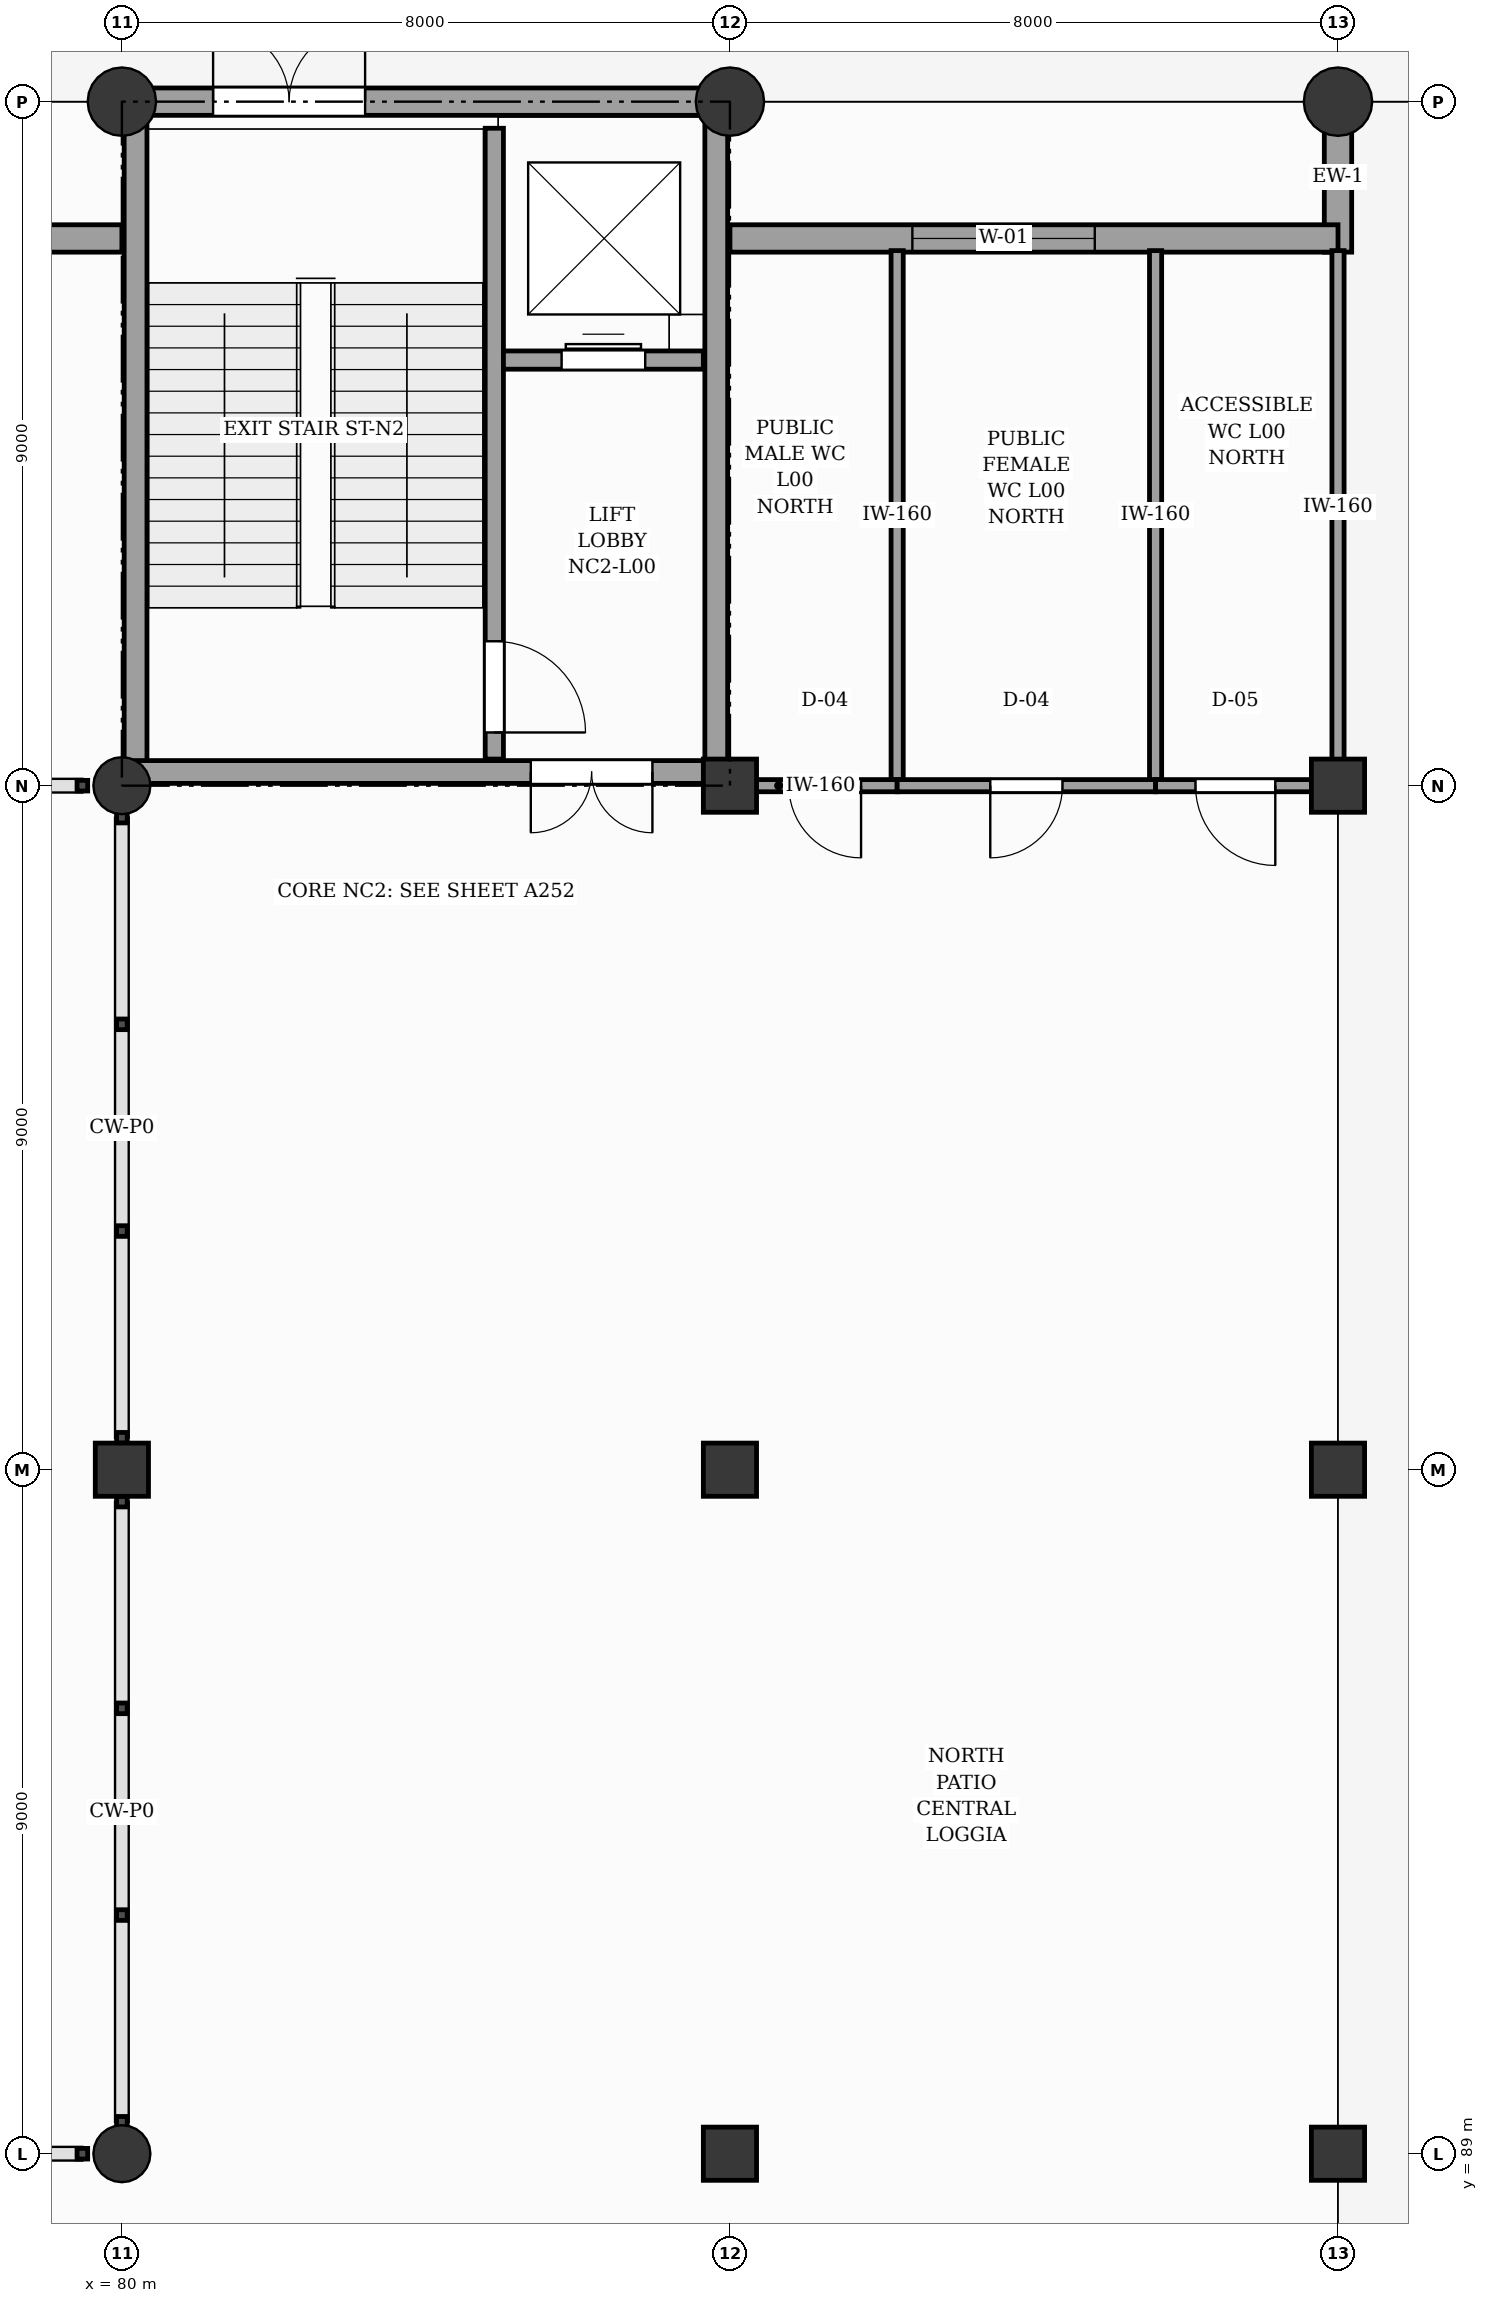
"""IFC4 building model, lengths in metres.
Left out: names, types, materials, properties, quantities, classifications, styles, units other than length and angle.
Written with IfcOpenShell. Run it as: python <this file> out.ifc"""

import sys

from ifc_helpers import new_model, si_unit, direction, frame, frame_2d, origin, origin_2d, place, context, subcontext, project, spatial, rectangle, circle, extrude, element, fill, save


model = new_model("IFC4")
c1 = context("Model", 3, precision=1e-05, world=origin(), true_north=direction((0.0, 1.0)))
c2 = subcontext(c1, "Body", "Model", "MODEL_VIEW")
j1 = project(units=[si_unit("LENGTHUNIT", "METRE"), si_unit("PLANEANGLEUNIT", "RADIAN")], contexts=[c1])
p1 = place(None, origin())
s1 = spatial("IfcSite", under=j1, at=p1, CompositionType="ELEMENT")
p2 = place(p1, origin())
s2 = spatial("IfcBuilding", under=s1, at=p2, CompositionType="ELEMENT")
p3 = place(p2, origin())
s3 = spatial("IfcBuildingStorey", under=s2, at=p3, CompositionType="ELEMENT", Elevation=0.0)
p4 = place(p3, frame((80.0, 89.0, -0.3), z_axis=(0.0, 0.0, 1.0), x_axis=(1.0, 0.0, 0.0)))
e1 = element("IfcColumn", 1, at=p4, inside=s3, PredefinedType="PILASTER", context=c2, shape_type="SweptSolid", body=[
    extrude(circle(Radius=0.375, at=origin_2d()), origin(), (0.0, 0.0, 1.0), 5.1),
])
p5 = place(p3, frame((80.0, 98.0, -0.3), z_axis=(0.0, 0.0, 1.0), x_axis=(1.0, 0.0, 0.0)))
e2 = element("IfcColumn", 2, at=p5, inside=s3, PredefinedType="COLUMN", context=c2, shape_type="SweptSolid", body=[
    extrude(rectangle(XDim=0.7, YDim=0.7, at=origin_2d()), origin(), (0.0, 0.0, 1.0), 5.1),
])
p6 = place(p3, frame((80.0, 107.0, -0.3), z_axis=(0.0, 0.0, 1.0), x_axis=(1.0, 0.0, 0.0)))
e3 = element("IfcColumn", 3, at=p6, inside=s3, PredefinedType="PILASTER", context=c2, shape_type="SweptSolid", body=[
    extrude(circle(Radius=0.375, at=origin_2d()), origin(), (0.0, 0.0, 1.0), 5.1),
])
p7 = place(p3, frame((80.0, 116.0, -0.3), z_axis=(0.0, 0.0, 1.0), x_axis=(1.0, 0.0, 0.0)))
e4 = element("IfcColumn", 4, at=p7, inside=s3, PredefinedType="PILASTER", context=c2, shape_type="SweptSolid", body=[
    extrude(circle(Radius=0.45, at=origin_2d()), origin(), (0.0, 0.0, 1.0), 5.1),
])
for number, where, z_axis, x_axis in (
    (5, (88.0, 89.0, -0.3), (0.0, 0.0, 1.0), (1.0, 0.0, 0.0)),
    (6, (88.0, 98.0, -0.3), (0.0, 0.0, 1.0), (1.0, 0.0, 0.0)),
    (7, (88.0, 107.0, -0.3), (0.0, 0.0, 1.0), (1.0, 0.0, 0.0)),
):
    element("IfcColumn", number, at=place(p3, frame(where, z_axis=z_axis, x_axis=x_axis)), inside=s3, PredefinedType="COLUMN", context=c2, shape_type="SweptSolid", body=[
        extrude(rectangle(XDim=0.7, YDim=0.7, at=origin_2d()), origin(), (0.0, 0.0, 1.0), 5.1),
    ])
p8 = place(p3, frame((88.0, 116.0, -0.3), z_axis=(0.0, 0.0, 1.0), x_axis=(1.0, 0.0, 0.0)))
e8 = element("IfcColumn", 8, at=p8, inside=s3, PredefinedType="PILASTER", context=c2, shape_type="SweptSolid", body=[
    extrude(circle(Radius=0.45, at=origin_2d()), origin(), (0.0, 0.0, 1.0), 5.1),
])
for number, where, z_axis, x_axis in (
    (9, (96.0, 89.0, -0.3), (0.0, 0.0, 1.0), (1.0, 0.0, 0.0)),
    (10, (96.0, 98.0, -0.3), (0.0, 0.0, 1.0), (1.0, 0.0, 0.0)),
    (11, (96.0, 107.0, -0.3), (0.0, 0.0, 1.0), (1.0, 0.0, 0.0)),
):
    element("IfcColumn", number, at=place(p3, frame(where, z_axis=z_axis, x_axis=x_axis)), inside=s3, PredefinedType="COLUMN", context=c2, shape_type="SweptSolid", body=[
        extrude(rectangle(XDim=0.7, YDim=0.7, at=origin_2d()), origin(), (0.0, 0.0, 1.0), 5.1),
    ])
p9 = place(p3, frame((96.0, 116.0, -0.3), z_axis=(0.0, 0.0, 1.0), x_axis=(1.0, 0.0, 0.0)))
e12 = element("IfcColumn", 12, at=p9, inside=s3, PredefinedType="PILASTER", context=c2, shape_type="SweptSolid", body=[
    extrude(circle(Radius=0.45, at=origin_2d()), origin(), (0.0, 0.0, 1.0), 5.1),
])
p10 = place(p3, frame((72.0, 114.2, 0.0), z_axis=(0.0, 0.0, 1.0), x_axis=(1.0, 0.0, 0.0)))
e13 = element("IfcWall", 13, at=p10, inside=s3, PredefinedType="SOLIDWALL", context=c2, shape_type="SweptSolid", body=[
    extrude(rectangle(XDim=8.0, YDim=0.36, at=frame_2d((4.0, 0.0))), origin(), (0.0, 0.0, 1.0), 3.84),
])
p11 = place(p10, frame((2.4, 0.0, 0.9)))
e14 = element("IfcOpeningElement", 14, at=p11, cuts=e13, PredefinedType="OPENING", context=c2, shape_type="SweptSolid", body=[
    extrude(rectangle(XDim=2.4, YDim=2.6, at=frame_2d((1.2, 1.3))), frame((0.0, 0.19, 0.0), z_axis=(0.0, -1.0, 0.0), x_axis=(1.0, 0.0, 0.0)), (0.0, 0.0, 1.0), 0.38),
])
p12 = place(p3, frame((80.4, 116.0, 0.0), z_axis=(0.0, 0.0, 1.0), x_axis=(1.0, 0.0, 0.0)))
e15 = element("IfcWall", 15, at=p12, inside=s3, PredefinedType="SOLIDWALL", context=c2, shape_type="SweptSolid", body=[
    extrude(rectangle(XDim=7.2, YDim=0.36, at=frame_2d((3.6, 0.0))), origin(), (0.0, 0.0, 1.0), 3.84),
])
p13 = place(p12, frame((0.8, 0.0, 0.0)))
e16 = element("IfcOpeningElement", 16, at=p13, cuts=e15, PredefinedType="OPENING", context=c2, shape_type="SweptSolid", body=[
    extrude(rectangle(XDim=2.0, YDim=2.2, at=frame_2d((1.0, 1.1))), frame((0.0, 0.19, 0.0), z_axis=(0.0, -1.0, 0.0), x_axis=(1.0, 0.0, 0.0)), (0.0, 0.0, 1.0), 0.38),
])
p14 = place(p3, frame((96.0, 114.02, 0.0), z_axis=(0.0, 0.0, 1.0), x_axis=(0.0, 1.0, 0.0)))
e17 = element("IfcWall", 17, at=p14, inside=s3, PredefinedType="SOLIDWALL", context=c2, shape_type="SweptSolid", body=[
    extrude(rectangle(XDim=1.98, YDim=0.36, at=frame_2d((0.99, 0.0))), origin(), (0.0, 0.0, 1.0), 3.84),
])
p15 = place(p3, frame((88.0, 114.2, 0.0), z_axis=(0.0, 0.0, 1.0), x_axis=(1.0, 0.0, 0.0)))
e18 = element("IfcWall", 18, at=p15, inside=s3, PredefinedType="SOLIDWALL", context=c2, shape_type="SweptSolid", body=[
    extrude(rectangle(XDim=8.0, YDim=0.36, at=frame_2d((4.0, 0.0))), origin(), (0.0, 0.0, 1.0), 3.84),
])
p16 = place(p15, frame((2.4, 0.0, 0.9)))
e19 = element("IfcOpeningElement", 19, at=p16, cuts=e18, PredefinedType="OPENING", context=c2, shape_type="SweptSolid", body=[
    extrude(rectangle(XDim=2.4, YDim=2.6, at=frame_2d((1.2, 1.3))), frame((0.0, 0.19, 0.0), z_axis=(0.0, -1.0, 0.0), x_axis=(1.0, 0.0, 0.0)), (0.0, 0.0, 1.0), 0.38),
])
p17 = place(p3, frame((84.9, 107.35, 0.0), z_axis=(0.0, 0.0, 1.0), x_axis=(0.0, 1.0, 0.0)))
e20 = element("IfcWall", 20, at=p17, inside=s3, PredefinedType="SHEAR", context=c2, shape_type="SweptSolid", body=[
    extrude(rectangle(XDim=8.3, YDim=0.24, at=frame_2d((4.15, 0.0))), origin(), (0.0, 0.0, 1.0), 4.52),
])
p18 = place(p17, frame((0.35, 0.0, 0.0)))
e21 = element("IfcOpeningElement", 21, at=p18, cuts=e20, PredefinedType="OPENING", context=c2, shape_type="SweptSolid", body=[
    extrude(rectangle(XDim=1.2, YDim=2.15, at=frame_2d((0.6, 1.075))), frame((0.0, 0.13, 0.0), z_axis=(0.0, -1.0, 0.0), x_axis=(1.0, 0.0, 0.0)), (0.0, 0.0, 1.0), 0.26),
])
p19 = place(p3, frame((85.02, 112.6, 0.0), z_axis=(0.0, 0.0, 1.0), x_axis=(1.0, 0.0, 0.0)))
e22 = element("IfcWall", 22, at=p19, inside=s3, PredefinedType="SHEAR", context=c2, shape_type="SweptSolid", body=[
    extrude(rectangle(XDim=2.63, YDim=0.24, at=frame_2d((1.315, 0.0))), origin(), (0.0, 0.0, 1.0), 4.52),
])
p20 = place(p19, frame((0.765, 0.0, 0.0)))
e23 = element("IfcOpeningElement", 23, at=p20, cuts=e22, PredefinedType="OPENING", context=c2, shape_type="SweptSolid", body=[
    extrude(rectangle(XDim=1.1, YDim=2.15, at=frame_2d((0.55, 1.075))), frame((0.0, 0.13, 0.0), z_axis=(0.0, -1.0, 0.0), x_axis=(1.0, 0.0, 0.0)), (0.0, 0.0, 1.0), 0.26),
])
for number, where, z_axis, x_axis in (
    (24, (80.18, 107.18, 0.0), (0.0, 0.0, 1.0), (0.0, 1.0, 0.0)),
    (25, (87.82, 107.18, 0.0), (0.0, 0.0, 1.0), (0.0, 1.0, 0.0)),
):
    element("IfcWall", number, at=place(p3, frame(where, z_axis=z_axis, x_axis=x_axis)), inside=s3, PredefinedType="SHEAR", context=c2, shape_type="SweptSolid", body=[
        extrude(rectangle(XDim=8.64, YDim=0.3, at=frame_2d((4.32, 0.0))), origin(), (0.0, 0.0, 1.0), 4.52),
    ])
p21 = place(p3, frame((80.03, 107.18, 0.0), z_axis=(0.0, 0.0, 1.0), x_axis=(1.0, 0.0, 0.0)))
e26 = element("IfcWall", 26, at=p21, inside=s3, PredefinedType="SHEAR", context=c2, shape_type="SweptSolid", body=[
    extrude(rectangle(XDim=7.94, YDim=0.3, at=frame_2d((3.97, 0.0))), origin(), (0.0, 0.0, 1.0), 4.52),
])
p22 = place(p21, frame((5.35, 0.0, 0.0)))
e27 = element("IfcOpeningElement", 27, at=p22, cuts=e26, PredefinedType="OPENING", context=c2, shape_type="SweptSolid", body=[
    extrude(rectangle(XDim=1.6, YDim=2.15, at=frame_2d((0.8, 1.075))), frame((0.0, 0.16, 0.0), z_axis=(0.0, -1.0, 0.0), x_axis=(1.0, 0.0, 0.0)), (0.0, 0.0, 1.0), 0.32),
])
p23 = place(p3, frame((88.3, 107.0, 0.0), z_axis=(0.0, 0.0, 1.0), x_axis=(1.0, 0.0, 0.0)))
e28 = element("IfcWall", 28, at=p23, inside=s3, PredefinedType="PARTITIONING", context=c2, shape_type="SweptSolid", body=[
    extrude(rectangle(XDim=1.9, YDim=0.16, at=frame_2d((0.95, 0.0))), origin(), (0.0, 0.0, 1.0), 3.7),
])
p24 = place(p23, frame((0.475, 0.0, 0.0)))
e29 = element("IfcOpeningElement", 29, at=p24, cuts=e28, PredefinedType="OPENING", context=c2, shape_type="SweptSolid", body=[
    extrude(rectangle(XDim=0.95, YDim=2.1, at=frame_2d((0.475, 1.05))), frame((0.0, 0.09, 0.0), z_axis=(0.0, -1.0, 0.0), x_axis=(1.0, 0.0, 0.0)), (0.0, 0.0, 1.0), 0.18),
])
p25 = place(p3, frame((90.2, 107.08, 0.0), z_axis=(0.0, 0.0, 1.0), x_axis=(0.0, 1.0, 0.0)))
e30 = element("IfcWall", 30, at=p25, inside=s3, PredefinedType="PARTITIONING", context=c2, shape_type="SweptSolid", body=[
    extrude(rectangle(XDim=6.96, YDim=0.16, at=frame_2d((3.48, 0.0))), origin(), (0.0, 0.0, 1.0), 3.7),
])
p26 = place(p3, frame((90.2, 107.0, 0.0), z_axis=(0.0, 0.0, 1.0), x_axis=(1.0, 0.0, 0.0)))
e31 = element("IfcWall", 31, at=p26, inside=s3, PredefinedType="PARTITIONING", context=c2, shape_type="SweptSolid", body=[
    extrude(rectangle(XDim=3.4, YDim=0.16, at=frame_2d((1.7, 0.0))), origin(), (0.0, 0.0, 1.0), 3.7),
])
p27 = place(p26, frame((1.225, 0.0, 0.0)))
e32 = element("IfcOpeningElement", 32, at=p27, cuts=e31, PredefinedType="OPENING", context=c2, shape_type="SweptSolid", body=[
    extrude(rectangle(XDim=0.95, YDim=2.1, at=frame_2d((0.475, 1.05))), frame((0.0, 0.09, 0.0), z_axis=(0.0, -1.0, 0.0), x_axis=(1.0, 0.0, 0.0)), (0.0, 0.0, 1.0), 0.18),
])
p28 = place(p3, frame((93.6, 107.08, 0.0), z_axis=(0.0, 0.0, 1.0), x_axis=(0.0, 1.0, 0.0)))
e33 = element("IfcWall", 33, at=p28, inside=s3, PredefinedType="PARTITIONING", context=c2, shape_type="SweptSolid", body=[
    extrude(rectangle(XDim=6.96, YDim=0.16, at=frame_2d((3.48, 0.0))), origin(), (0.0, 0.0, 1.0), 3.7),
])
p29 = place(p3, frame((93.6, 107.0, 0.0), z_axis=(0.0, 0.0, 1.0), x_axis=(1.0, 0.0, 0.0)))
e34 = element("IfcWall", 34, at=p29, inside=s3, PredefinedType="PARTITIONING", context=c2, shape_type="SweptSolid", body=[
    extrude(rectangle(XDim=2.1, YDim=0.16, at=frame_2d((1.05, 0.0))), origin(), (0.0, 0.0, 1.0), 3.7),
])
p30 = place(p29, frame((0.525, 0.0, 0.0)))
e35 = element("IfcOpeningElement", 35, at=p30, cuts=e34, PredefinedType="OPENING", context=c2, shape_type="SweptSolid", body=[
    extrude(rectangle(XDim=1.05, YDim=2.1, at=frame_2d((0.525, 1.05))), frame((0.0, 0.09, 0.0), z_axis=(0.0, -1.0, 0.0), x_axis=(1.0, 0.0, 0.0)), (0.0, 0.0, 1.0), 0.18),
])
p31 = place(p3, frame((96.0, 107.3, 0.0), z_axis=(0.0, 0.0, 1.0), x_axis=(0.0, 1.0, 0.0)))
e36 = element("IfcWall", 36, at=p31, inside=s3, PredefinedType="PARTITIONING", context=c2, shape_type="SweptSolid", body=[
    extrude(rectangle(XDim=6.74, YDim=0.16, at=frame_2d((3.37, 0.0))), origin(), (0.0, 0.0, 1.0), 3.7),
])
p32 = place(p13, origin())
e37 = element("IfcDoor", 37, at=p32, inside=s3, OperationType="DOUBLE_DOOR_SINGLE_SWING", PredefinedType="DOOR", context=c2, shape_type="SweptSolid", body=[
    extrude(rectangle(XDim=2.0, YDim=2.2, at=frame_2d((1.0, 1.1))), frame((0.0, 0.025, 0.0), z_axis=(0.0, -1.0, 0.0), x_axis=(1.0, 0.0, 0.0)), (0.0, 0.0, 1.0), 0.05),
])
fill(e16, e37)
p33 = place(p16, origin())
e38 = element("IfcWindow", 38, at=p33, inside=s3, PartitioningType="SINGLE_PANEL", PredefinedType="WINDOW", context=c2, shape_type="SweptSolid", body=[
    extrude(rectangle(XDim=2.4, YDim=2.6, at=frame_2d((1.2, 1.3))), frame((0.0, 0.03, 0.0), z_axis=(0.0, -1.0, 0.0), x_axis=(1.0, 0.0, 0.0)), (0.0, 0.0, 1.0), 0.06),
])
fill(e19, e38)
p34 = place(p18, frame((1.2, 0.0, 0.0), z_axis=(0.0, 0.0, 1.0), x_axis=(-1.0, 0.0, 0.0)))
e39 = element("IfcDoor", 39, at=p34, inside=s3, OperationType="SINGLE_SWING_LEFT", PredefinedType="DOOR", context=c2, shape_type="SweptSolid", body=[
    extrude(rectangle(XDim=1.2, YDim=2.15, at=frame_2d((0.6, 1.075))), frame((0.0, 0.025, 0.0), z_axis=(0.0, -1.0, 0.0), x_axis=(1.0, 0.0, 0.0)), (0.0, 0.0, 1.0), 0.05),
])
fill(e21, e39)
p35 = place(p20, origin())
e40 = element("IfcDoor", 40, at=p35, inside=s3, OperationType="DOUBLE_DOOR_SLIDING", PredefinedType="DOOR", context=c2, shape_type="SweptSolid", body=[
    extrude(rectangle(XDim=1.1, YDim=2.15, at=frame_2d((0.55, 1.075))), frame((0.0, 0.025, 0.0), z_axis=(0.0, -1.0, 0.0), x_axis=(1.0, 0.0, 0.0)), (0.0, 0.0, 1.0), 0.05),
])
fill(e23, e40)
p36 = place(p22, frame((1.6, 0.0, 0.0), z_axis=(0.0, 0.0, 1.0), x_axis=(-1.0, 0.0, 0.0)))
e41 = element("IfcDoor", 41, at=p36, inside=s3, OperationType="DOUBLE_DOOR_SINGLE_SWING", PredefinedType="DOOR", context=c2, shape_type="SweptSolid", body=[
    extrude(rectangle(XDim=1.6, YDim=2.15, at=frame_2d((0.8, 1.075))), frame((0.0, 0.025, 0.0), z_axis=(0.0, -1.0, 0.0), x_axis=(1.0, 0.0, 0.0)), (0.0, 0.0, 1.0), 0.05),
])
fill(e27, e41)
p37 = place(p24, frame((0.95, 0.0, 0.0), z_axis=(0.0, 0.0, 1.0), x_axis=(-1.0, 0.0, 0.0)))
e42 = element("IfcDoor", 42, at=p37, inside=s3, OperationType="SINGLE_SWING_RIGHT", PredefinedType="DOOR", context=c2, shape_type="SweptSolid", body=[
    extrude(rectangle(XDim=0.95, YDim=2.1, at=frame_2d((0.475, 1.05))), frame((0.0, 0.025, 0.0), z_axis=(0.0, -1.0, 0.0), x_axis=(1.0, 0.0, 0.0)), (0.0, 0.0, 1.0), 0.05),
])
fill(e29, e42)
p38 = place(p27, frame((0.95, 0.0, 0.0), z_axis=(0.0, 0.0, 1.0), x_axis=(-1.0, 0.0, 0.0)))
e43 = element("IfcDoor", 43, at=p38, inside=s3, OperationType="SINGLE_SWING_LEFT", PredefinedType="DOOR", context=c2, shape_type="SweptSolid", body=[
    extrude(rectangle(XDim=0.95, YDim=2.1, at=frame_2d((0.475, 1.05))), frame((0.0, 0.025, 0.0), z_axis=(0.0, -1.0, 0.0), x_axis=(1.0, 0.0, 0.0)), (0.0, 0.0, 1.0), 0.05),
])
fill(e32, e43)
p39 = place(p30, frame((1.05, 0.0, 0.0), z_axis=(0.0, 0.0, 1.0), x_axis=(-1.0, 0.0, 0.0)))
e44 = element("IfcDoor", 44, at=p39, inside=s3, OperationType="SINGLE_SWING_RIGHT", PredefinedType="DOOR", context=c2, shape_type="SweptSolid", body=[
    extrude(rectangle(XDim=1.05, YDim=2.1, at=frame_2d((0.525, 1.05))), frame((0.0, 0.025, 0.0), z_axis=(0.0, -1.0, 0.0), x_axis=(1.0, 0.0, 0.0)), (0.0, 0.0, 1.0), 0.05),
])
fill(e35, e44)
save(model, sys.argv[1])
